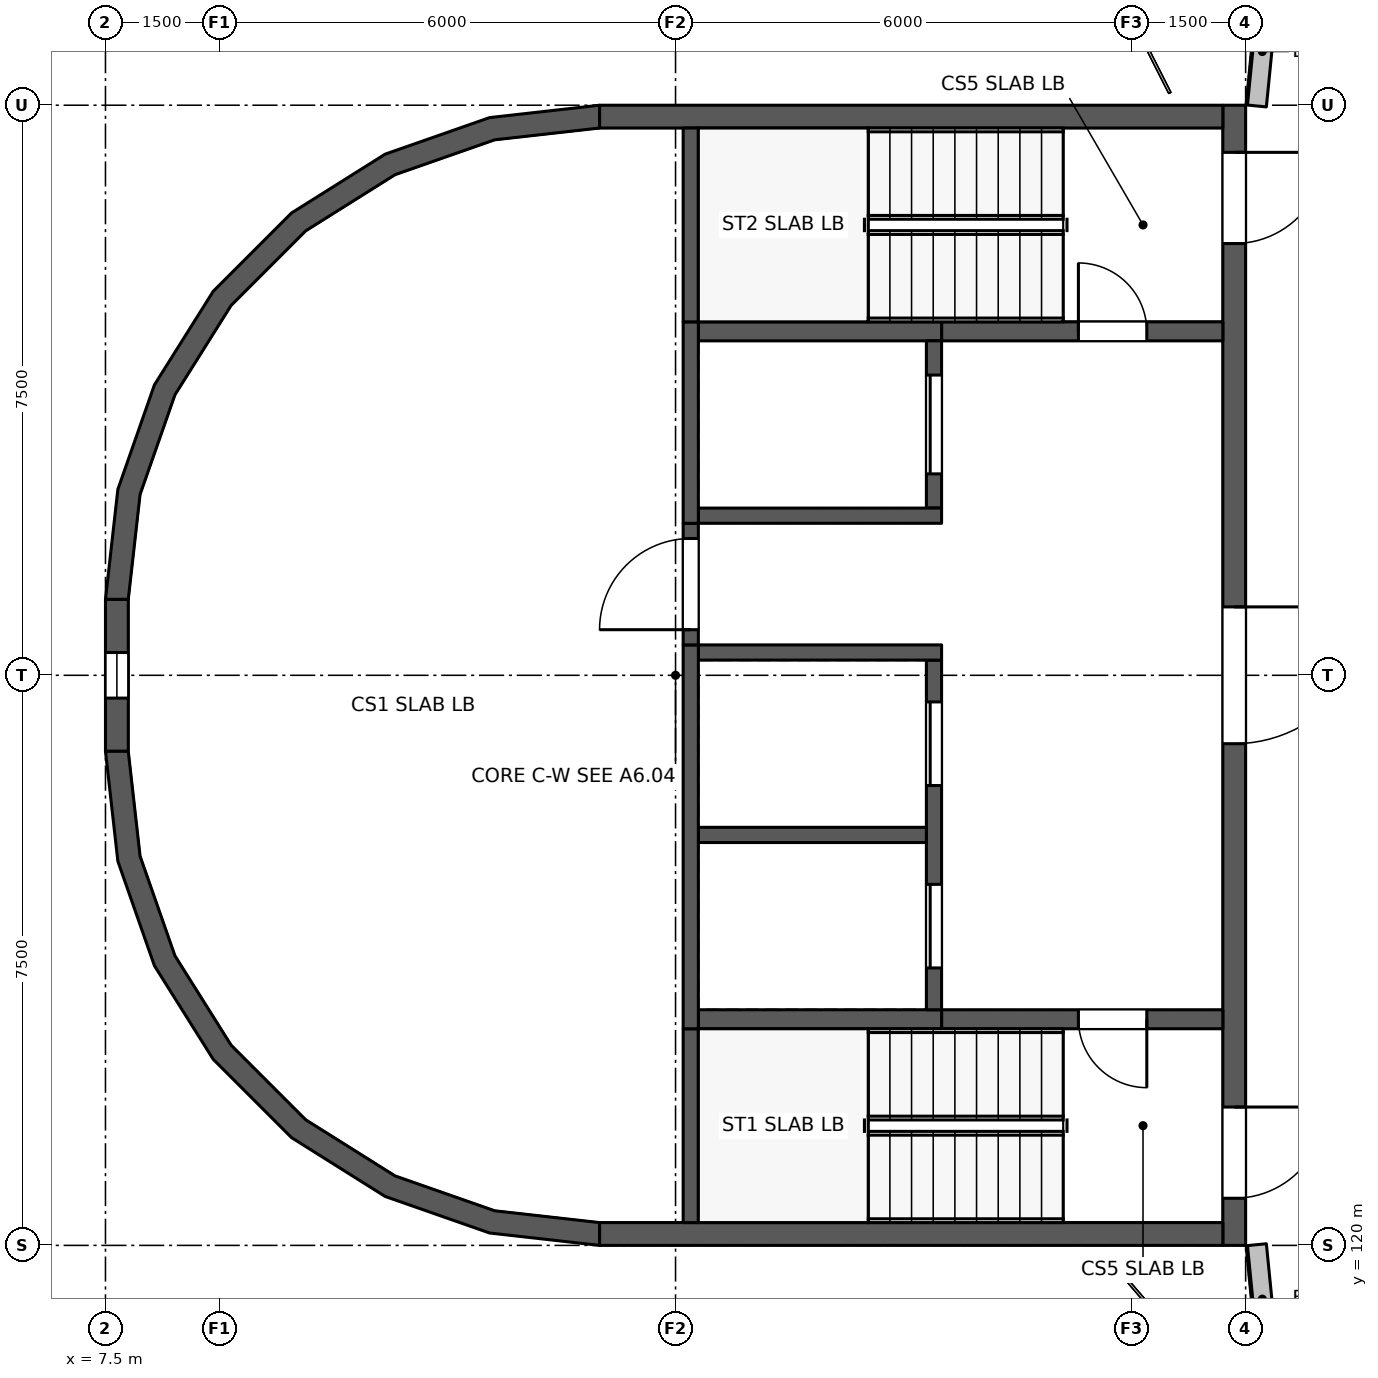
"""IFC4 building model, lengths in metres.
Left out: names, types, materials, properties, quantities, classifications, styles, units other than length and angle.
Written with IfcOpenShell. Run it as: python <this file> out.ifc"""

import sys

from ifc_helpers import new_model, si_unit, direction, frame, frame_2d, origin, place, context, subcontext, project, spatial, polyline, rectangle, outline, extrude, element, fill, save


model = new_model("IFC4")
c1 = context("Model", 3, precision=1e-05, world=origin(), true_north=direction((0.0, 1.0)))
c2 = subcontext(c1, "Body", "Model", "MODEL_VIEW")
j1 = project(units=[si_unit("LENGTHUNIT", "METRE"), si_unit("PLANEANGLEUNIT", "RADIAN")], contexts=[c1])
p1 = place(None, origin())
s1 = spatial("IfcSite", under=j1, at=p1, CompositionType="ELEMENT")
p2 = place(p1, origin())
s2 = spatial("IfcBuilding", under=s1, at=p2, CompositionType="ELEMENT")
p3 = place(p2, frame((0.0, 0.0, 9.9)))
s3 = spatial("IfcBuildingStorey", under=s2, at=p3, CompositionType="ELEMENT", Elevation=9.9)
p4 = place(p3, frame((22.79, 136.423, 0.0), z_axis=(0.0, 0.0, 1.0), x_axis=(-0.098479948823, -0.995139035351, 0.0)))
e1 = element("IfcWall", 1, at=p4, inside=s3, PredefinedType="SOLIDWALL", context=c2, shape_type="SweptSolid", body=[
    extrude(rectangle(XDim=1.44, YDim=0.25, at=frame_2d((0.72, 0.0))), origin(), (0.0, 0.0, 1.0), 1.1),
])
p5 = place(p3, frame((22.648, 120.01, 0.0), z_axis=(0.0, 0.0, 1.0), x_axis=(0.098664443357, -0.995120760319, 0.0)))
e2 = element("IfcWall", 2, at=p5, inside=s3, PredefinedType="SOLIDWALL", context=c2, shape_type="SweptSolid", body=[
    extrude(rectangle(XDim=1.44, YDim=0.25, at=frame_2d((0.72, 0.0))), origin(), (0.0, 0.0, 1.0), 1.1),
])
p6 = place(p3, frame((22.35, 135.0, 0.0), z_axis=(0.0, 0.0, 1.0), x_axis=(0.0, -1.0, 0.0)))
e3 = element("IfcWall", 3, at=p6, inside=s3, PredefinedType="SHEAR", context=c2, shape_type="SweptSolid", body=[
    extrude(rectangle(XDim=15.0, YDim=0.3, at=frame_2d((7.5, 0.0))), origin(), (0.0, 0.0, 1.0), 3.3),
])
p7 = place(p6, frame((13.18, 0.0, 0.0)))
e4 = element("IfcOpeningElement", 4, at=p7, cuts=e3, PredefinedType="OPENING", context=c2, shape_type="SweptSolid", body=[
    extrude(rectangle(XDim=1.2, YDim=2.1, at=frame_2d((0.6, 1.05))), frame((0.0, 0.16, 0.0), z_axis=(0.0, -1.0, 0.0), x_axis=(1.0, 0.0, 0.0)), (0.0, 0.0, 1.0), 0.32),
])
p8 = place(p6, frame((0.62, 0.0, 0.0)))
e5 = element("IfcOpeningElement", 5, at=p8, cuts=e3, PredefinedType="OPENING", context=c2, shape_type="SweptSolid", body=[
    extrude(rectangle(XDim=1.2, YDim=2.1, at=frame_2d((0.6, 1.05))), frame((0.0, 0.16, 0.0), z_axis=(0.0, -1.0, 0.0), x_axis=(1.0, 0.0, 0.0)), (0.0, 0.0, 1.0), 0.32),
])
p9 = place(p6, frame((6.6, 0.0, 0.0)))
e6 = element("IfcOpeningElement", 6, at=p9, cuts=e3, PredefinedType="OPENING", context=c2, shape_type="SweptSolid", body=[
    extrude(rectangle(XDim=1.8, YDim=2.1, at=frame_2d((0.9, 1.05))), frame((0.0, 0.16, 0.0), z_axis=(0.0, -1.0, 0.0), x_axis=(1.0, 0.0, 0.0)), (0.0, 0.0, 1.0), 0.32),
])
p10 = place(p3, frame((7.65, 126.5, 0.0), z_axis=(0.0, 0.0, 1.0), x_axis=(0.0, 1.0, 0.0)))
e7 = element("IfcWall", 7, at=p10, inside=s3, PredefinedType="SHEAR", context=c2, shape_type="SweptSolid", body=[
    extrude(rectangle(XDim=2.0, YDim=0.3, at=frame_2d((1.0, 0.0))), origin(), (0.0, 0.0, 1.0), 3.3),
])
p11 = place(p10, frame((0.7, 0.0, 0.3)))
e8 = element("IfcOpeningElement", 8, at=p11, cuts=e7, PredefinedType="OPENING", context=c2, shape_type="SweptSolid", body=[
    extrude(rectangle(XDim=0.6, YDim=2.7, at=frame_2d((0.3, 1.35))), frame((0.0, 0.16, 0.0), z_axis=(0.0, -1.0, 0.0), x_axis=(1.0, 0.0, 0.0)), (0.0, 0.0, 1.0), 0.32),
])
for number, where, z_axis, x_axis in (
    (9, (22.2, 120.15, 0.0), (0.0, 0.0, 1.0), (-1.0, 0.0, 0.0)),
    (10, (14.0, 134.85, 0.0), (0.0, 0.0, 1.0), (1.0, 0.0, 0.0)),
):
    element("IfcWall", number, at=place(p3, frame(where, z_axis=z_axis, x_axis=x_axis)), inside=s3, PredefinedType="SHEAR", context=c2, shape_type="SweptSolid", body=[
        extrude(rectangle(XDim=8.2, YDim=0.3, at=frame_2d((4.1, 0.0))), origin(), (0.0, 0.0, 1.0), 3.3),
    ])
p12 = place(p3, frame((22.2, 122.975, 0.0), z_axis=(0.0, 0.0, 1.0), x_axis=(-1.0, 0.0, 0.0)))
e11 = element("IfcWall", 11, at=p12, inside=s3, PredefinedType="STANDARD", context=c2, shape_type="SweptSolid", body=[
    extrude(rectangle(XDim=3.7, YDim=0.25, at=frame_2d((1.85, 0.0))), origin(), (0.0, 0.0, 1.0), 3.1),
])
p13 = place(p12, frame((1.0, 0.0, 0.0)))
e12 = element("IfcOpeningElement", 12, at=p13, cuts=e11, PredefinedType="OPENING", context=c2, shape_type="SweptSolid", body=[
    extrude(rectangle(XDim=0.9, YDim=2.1, at=frame_2d((0.45, 1.05))), frame((0.0, 0.135, 0.0), z_axis=(0.0, -1.0, 0.0), x_axis=(1.0, 0.0, 0.0)), (0.0, 0.0, 1.0), 0.27),
])
p14 = place(p3, frame((18.5, 122.975, 0.0), z_axis=(0.0, 0.0, 1.0), x_axis=(-1.0, 0.0, 0.0)))
e13 = element("IfcWall", 13, at=p14, inside=s3, PredefinedType="STANDARD", context=c2, shape_type="SweptSolid", body=[
    extrude(rectangle(XDim=3.2, YDim=0.25, at=frame_2d((1.6, 0.0))), origin(), (0.0, 0.0, 1.0), 3.1),
])
p15 = place(p3, frame((18.5, 132.025, 0.0), z_axis=(0.0, 0.0, 1.0), x_axis=(1.0, 0.0, 0.0)))
e14 = element("IfcWall", 14, at=p15, inside=s3, PredefinedType="STANDARD", context=c2, shape_type="SweptSolid", body=[
    extrude(rectangle(XDim=3.7, YDim=0.25, at=frame_2d((1.85, 0.0))), origin(), (0.0, 0.0, 1.0), 3.1),
])
p16 = place(p15, frame((1.8, 0.0, 0.0)))
e15 = element("IfcOpeningElement", 15, at=p16, cuts=e14, PredefinedType="OPENING", context=c2, shape_type="SweptSolid", body=[
    extrude(rectangle(XDim=0.9, YDim=2.1, at=frame_2d((0.45, 1.05))), frame((0.0, 0.135, 0.0), z_axis=(0.0, -1.0, 0.0), x_axis=(1.0, 0.0, 0.0)), (0.0, 0.0, 1.0), 0.27),
])
p17 = place(p3, frame((18.5, 132.025, 0.0), z_axis=(0.0, 0.0, 1.0), x_axis=(-1.0, 0.0, 0.0)))
e16 = element("IfcWall", 16, at=p17, inside=s3, PredefinedType="STANDARD", context=c2, shape_type="SweptSolid", body=[
    extrude(rectangle(XDim=3.2, YDim=0.25, at=frame_2d((1.6, 0.0))), origin(), (0.0, 0.0, 1.0), 3.1),
])
p18 = place(p3, frame((18.4, 123.1, 0.0), z_axis=(0.0, 0.0, 1.0), x_axis=(0.0, 1.0, 0.0)))
e17 = element("IfcWall", 17, at=p18, inside=s3, PredefinedType="STANDARD", context=c2, shape_type="SweptSolid", body=[
    extrude(rectangle(XDim=4.6, YDim=0.2, at=frame_2d((2.3, 0.0))), origin(), (0.0, 0.0, 1.0), 3.1),
])
p19 = place(p18, frame((0.55, 0.0, 0.0)))
e18 = element("IfcOpeningElement", 18, at=p19, cuts=e17, PredefinedType="OPENING", context=c2, shape_type="SweptSolid", body=[
    extrude(rectangle(XDim=1.1, YDim=2.1, at=frame_2d((0.55, 1.05))), frame((0.0, 0.11, 0.0), z_axis=(0.0, -1.0, 0.0), x_axis=(1.0, 0.0, 0.0)), (0.0, 0.0, 1.0), 0.22),
])
p20 = place(p18, frame((2.95, 0.0, 0.0)))
e19 = element("IfcOpeningElement", 19, at=p20, cuts=e17, PredefinedType="OPENING", context=c2, shape_type="SweptSolid", body=[
    extrude(rectangle(XDim=1.1, YDim=2.1, at=frame_2d((0.55, 1.05))), frame((0.0, 0.11, 0.0), z_axis=(0.0, -1.0, 0.0), x_axis=(1.0, 0.0, 0.0)), (0.0, 0.0, 1.0), 0.22),
])
p21 = place(p3, frame((18.4, 129.7, 0.0), z_axis=(0.0, 0.0, 1.0), x_axis=(0.0, 1.0, 0.0)))
e20 = element("IfcWall", 20, at=p21, inside=s3, PredefinedType="STANDARD", context=c2, shape_type="SweptSolid", body=[
    extrude(rectangle(XDim=2.2, YDim=0.2, at=frame_2d((1.1, 0.0))), origin(), (0.0, 0.0, 1.0), 3.1),
])
p22 = place(p21, frame((0.45, 0.0, 0.0)))
e21 = element("IfcOpeningElement", 21, at=p22, cuts=e20, PredefinedType="OPENING", context=c2, shape_type="SweptSolid", body=[
    extrude(rectangle(XDim=1.3, YDim=2.1, at=frame_2d((0.65, 1.05))), frame((0.0, 0.11, 0.0), z_axis=(0.0, -1.0, 0.0), x_axis=(1.0, 0.0, 0.0)), (0.0, 0.0, 1.0), 0.22),
])
p23 = place(p3, frame((18.3, 125.4, 0.0), z_axis=(0.0, 0.0, 1.0), x_axis=(-1.0, 0.0, 0.0)))
e22 = element("IfcWall", 22, at=p23, inside=s3, PredefinedType="STANDARD", context=c2, shape_type="SweptSolid", body=[
    extrude(rectangle(XDim=3.0, YDim=0.2, at=frame_2d((1.5, 0.0))), origin(), (0.0, 0.0, 1.0), 3.1),
])
for number, where, z_axis, x_axis in (
    (23, (18.5, 127.8, 0.0), (0.0, 0.0, 1.0), (-1.0, 0.0, 0.0)),
    (24, (18.5, 129.6, 0.0), (0.0, 0.0, 1.0), (-1.0, 0.0, 0.0)),
):
    element("IfcWall", number, at=place(p3, frame(where, z_axis=z_axis, x_axis=x_axis)), inside=s3, PredefinedType="STANDARD", context=c2, shape_type="SweptSolid", body=[
        extrude(rectangle(XDim=3.2, YDim=0.2, at=frame_2d((1.6, 0.0))), origin(), (0.0, 0.0, 1.0), 3.1),
    ])
p24 = place(p3, frame((15.2, 120.3, 0.0), z_axis=(0.0, 0.0, 1.0), x_axis=(0.0, 1.0, 0.0)))
e25 = element("IfcWall", 25, at=p24, inside=s3, PredefinedType="STANDARD", context=c2, shape_type="SweptSolid", body=[
    extrude(rectangle(XDim=2.55, YDim=0.2, at=frame_2d((1.275, 0.0))), origin(), (0.0, 0.0, 1.0), 3.1),
])
p25 = place(p3, frame((15.2, 122.85, 0.0), z_axis=(0.0, 0.0, 1.0), x_axis=(0.0, 1.0, 0.0)))
e26 = element("IfcWall", 26, at=p25, inside=s3, PredefinedType="STANDARD", context=c2, shape_type="SweptSolid", body=[
    extrude(rectangle(XDim=5.05, YDim=0.2, at=frame_2d((2.525, 0.0))), origin(), (0.0, 0.0, 1.0), 3.1),
])
p26 = place(p3, frame((15.2, 127.9, 0.0), z_axis=(0.0, 0.0, 1.0), x_axis=(0.0, 1.0, 0.0)))
e27 = element("IfcWall", 27, at=p26, inside=s3, PredefinedType="STANDARD", context=c2, shape_type="SweptSolid", body=[
    extrude(rectangle(XDim=1.6, YDim=0.2, at=frame_2d((0.8, 0.0))), origin(), (0.0, 0.0, 1.0), 3.1),
])
p27 = place(p26, frame((0.2, 0.0, 0.0)))
e28 = element("IfcOpeningElement", 28, at=p27, cuts=e27, PredefinedType="OPENING", context=c2, shape_type="SweptSolid", body=[
    extrude(rectangle(XDim=1.2, YDim=2.1, at=frame_2d((0.6, 1.05))), frame((0.0, 0.11, 0.0), z_axis=(0.0, -1.0, 0.0), x_axis=(1.0, 0.0, 0.0)), (0.0, 0.0, 1.0), 0.22),
])
p28 = place(p3, frame((15.2, 129.5, 0.0), z_axis=(0.0, 0.0, 1.0), x_axis=(0.0, 1.0, 0.0)))
e29 = element("IfcWall", 29, at=p28, inside=s3, PredefinedType="STANDARD", context=c2, shape_type="SweptSolid", body=[
    extrude(rectangle(XDim=2.65, YDim=0.2, at=frame_2d((1.325, 0.0))), origin(), (0.0, 0.0, 1.0), 3.1),
])
p29 = place(p3, frame((15.2, 132.15, 0.0), z_axis=(0.0, 0.0, 1.0), x_axis=(0.0, 1.0, 0.0)))
e30 = element("IfcWall", 30, at=p29, inside=s3, PredefinedType="STANDARD", context=c2, shape_type="SweptSolid", body=[
    extrude(rectangle(XDim=2.55, YDim=0.2, at=frame_2d((1.275, 0.0))), origin(), (0.0, 0.0, 1.0), 3.1),
])
p30 = place(p3, origin())
e31 = element("IfcWall", 31, at=p30, inside=s3, PredefinedType="SHEAR", context=c2, shape_type="SweptSolid", body=[
    extrude(outline(polyline([(14.0, 120.0), (12.554, 120.163), (11.18, 120.644), (9.947, 121.418), (8.918, 122.447), (8.144, 123.68), (7.663, 125.054), (7.5, 126.5), (7.8, 126.5), (7.955, 125.12), (8.414, 123.81), (9.153, 122.635), (10.135, 121.653), (11.31, 120.914), (12.62, 120.455), (14.0, 120.3), (14.0, 120.0)])), origin(), (0.0, 0.0, 1.0), 3.3),
])
p31 = place(p3, origin())
e32 = element("IfcWall", 32, at=p31, inside=s3, PredefinedType="SHEAR", context=c2, shape_type="SweptSolid", body=[
    extrude(outline(polyline([(14.0, 135.0), (12.554, 134.837), (11.18, 134.356), (9.947, 133.582), (8.918, 132.553), (8.144, 131.32), (7.663, 129.946), (7.5, 128.5), (7.8, 128.5), (7.955, 129.88), (8.414, 131.19), (9.153, 132.365), (10.135, 133.347), (11.31, 134.086), (12.62, 134.545), (14.0, 134.7), (14.0, 135.0)])), origin(), (0.0, 0.0, 1.0), 3.3),
])
p32 = place(p7, origin())
e33 = element("IfcDoor", 33, at=p32, inside=s3, OperationType="SINGLE_SWING_RIGHT", PredefinedType="DOOR", context=c2, shape_type="SweptSolid", body=[
    extrude(rectangle(XDim=1.2, YDim=2.1, at=frame_2d((0.6, 1.05))), frame((0.0, 0.025, 0.0), z_axis=(0.0, -1.0, 0.0), x_axis=(1.0, 0.0, 0.0)), (0.0, 0.0, 1.0), 0.05),
])
fill(e4, e33)
p33 = place(p8, origin())
e34 = element("IfcDoor", 34, at=p33, inside=s3, OperationType="SINGLE_SWING_LEFT", PredefinedType="DOOR", context=c2, shape_type="SweptSolid", body=[
    extrude(rectangle(XDim=1.2, YDim=2.1, at=frame_2d((0.6, 1.05))), frame((0.0, 0.025, 0.0), z_axis=(0.0, -1.0, 0.0), x_axis=(1.0, 0.0, 0.0)), (0.0, 0.0, 1.0), 0.05),
])
fill(e5, e34)
p34 = place(p9, origin())
e35 = element("IfcDoor", 35, at=p34, inside=s3, OperationType="DOUBLE_DOOR_SINGLE_SWING", PredefinedType="DOOR", context=c2, shape_type="SweptSolid", body=[
    extrude(rectangle(XDim=1.8, YDim=2.1, at=frame_2d((0.9, 1.05))), frame((0.0, 0.025, 0.0), z_axis=(0.0, -1.0, 0.0), x_axis=(1.0, 0.0, 0.0)), (0.0, 0.0, 1.0), 0.05),
])
fill(e6, e35)
p35 = place(p13, origin())
e36 = element("IfcDoor", 36, at=p35, inside=s3, OperationType="SINGLE_SWING_LEFT", PredefinedType="DOOR", context=c2, shape_type="SweptSolid", body=[
    extrude(rectangle(XDim=0.9, YDim=2.1, at=frame_2d((0.45, 1.05))), frame((0.0, 0.025, 0.0), z_axis=(0.0, -1.0, 0.0), x_axis=(1.0, 0.0, 0.0)), (0.0, 0.0, 1.0), 0.05),
])
fill(e12, e36)
p36 = place(p16, origin())
e37 = element("IfcDoor", 37, at=p36, inside=s3, OperationType="SINGLE_SWING_RIGHT", PredefinedType="DOOR", context=c2, shape_type="SweptSolid", body=[
    extrude(rectangle(XDim=0.9, YDim=2.1, at=frame_2d((0.45, 1.05))), frame((0.0, 0.025, 0.0), z_axis=(0.0, -1.0, 0.0), x_axis=(1.0, 0.0, 0.0)), (0.0, 0.0, 1.0), 0.05),
])
fill(e15, e37)
p37 = place(p19, origin())
e38 = element("IfcDoor", 38, at=p37, inside=s3, OperationType="DOUBLE_DOOR_SLIDING", PredefinedType="DOOR", context=c2, shape_type="SweptSolid", body=[
    extrude(rectangle(XDim=1.1, YDim=2.1, at=frame_2d((0.55, 1.05))), frame((0.0, 0.025, 0.0), z_axis=(0.0, -1.0, 0.0), x_axis=(1.0, 0.0, 0.0)), (0.0, 0.0, 1.0), 0.05),
])
fill(e18, e38)
p38 = place(p20, origin())
e39 = element("IfcDoor", 39, at=p38, inside=s3, OperationType="DOUBLE_DOOR_SLIDING", PredefinedType="DOOR", context=c2, shape_type="SweptSolid", body=[
    extrude(rectangle(XDim=1.1, YDim=2.1, at=frame_2d((0.55, 1.05))), frame((0.0, 0.025, 0.0), z_axis=(0.0, -1.0, 0.0), x_axis=(1.0, 0.0, 0.0)), (0.0, 0.0, 1.0), 0.05),
])
fill(e19, e39)
p39 = place(p22, origin())
e40 = element("IfcDoor", 40, at=p39, inside=s3, OperationType="DOUBLE_DOOR_SLIDING", PredefinedType="DOOR", context=c2, shape_type="SweptSolid", body=[
    extrude(rectangle(XDim=1.3, YDim=2.1, at=frame_2d((0.65, 1.05))), frame((0.0, 0.025, 0.0), z_axis=(0.0, -1.0, 0.0), x_axis=(1.0, 0.0, 0.0)), (0.0, 0.0, 1.0), 0.05),
])
fill(e21, e40)
p40 = place(p27, origin())
e41 = element("IfcDoor", 41, at=p40, inside=s3, OperationType="SINGLE_SWING_RIGHT", PredefinedType="DOOR", context=c2, shape_type="SweptSolid", body=[
    extrude(rectangle(XDim=1.2, YDim=2.1, at=frame_2d((0.6, 1.05))), frame((0.0, 0.025, 0.0), z_axis=(0.0, -1.0, 0.0), x_axis=(1.0, 0.0, 0.0)), (0.0, 0.0, 1.0), 0.05),
])
fill(e28, e41)
p41 = place(p11, origin())
e42 = element("IfcWindow", 42, at=p41, inside=s3, PartitioningType="SINGLE_PANEL", PredefinedType="WINDOW", context=c2, shape_type="SweptSolid", body=[
    extrude(rectangle(XDim=0.6, YDim=2.7, at=frame_2d((0.3, 1.35))), frame((0.0, 0.03, 0.0), z_axis=(0.0, -1.0, 0.0), x_axis=(1.0, 0.0, 0.0)), (0.0, 0.0, 1.0), 0.06),
])
fill(e8, e42)
save(model, sys.argv[1])
